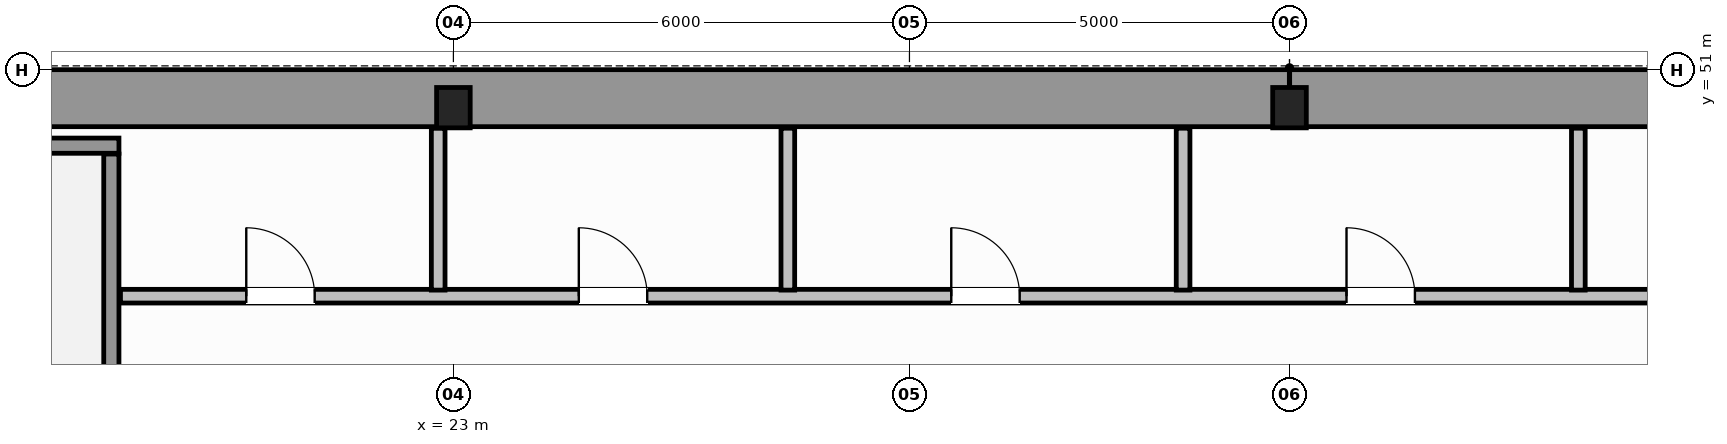
"""IFC4 building model, lengths in metres.
Left out: names, types, materials, properties, quantities, classifications, styles, units other than length and angle.
Written with IfcOpenShell. Run it as: python <this file> out.ifc"""

import sys

from ifc_helpers import new_model, si_unit, direction, frame, frame_2d, origin, origin_2d, place, context, subcontext, project, spatial, rectangle, i_section, extrude, source, transform, mapped, element, fill, save


model = new_model("IFC4")
c1 = context("Model", 3, precision=1e-05, world=origin(), true_north=direction((0.0, 1.0)))
c2 = subcontext(c1, "Body", "Model", "MODEL_VIEW")
j1 = project(units=[si_unit("LENGTHUNIT", "METRE"), si_unit("PLANEANGLEUNIT", "RADIAN")], contexts=[c1])
p1 = place(None, origin())
s1 = spatial("IfcSite", under=j1, at=p1, CompositionType="ELEMENT")
p2 = place(p1, origin())
s2 = spatial("IfcBuilding", under=s1, at=p2, CompositionType="ELEMENT")
p3 = place(p2, frame((0.0, 0.0, 95.8)))
s3 = spatial("IfcBuildingStorey", under=s2, at=p3, CompositionType="ELEMENT", Elevation=95.8)
m1 = source(origin(), c2, "Body", "SweptSolid", [
    extrude(i_section(OverallWidth=0.442, OverallDepth=0.531, WebThickness=0.065, FlangeThickness=0.076, FilletRadius=0.015, at=origin_2d()), origin(), (0.0, 0.0, 1.0), 3.8),
])
for number, where, z_axis, x_axis in (
    (1, (23.0, 50.5, 0.0), (0.0, 0.0, 1.0), (1.0, 0.0, 0.0)),
    (2, (34.0, 50.5, 0.0), (0.0, 0.0, 1.0), (1.0, 0.0, 0.0)),
):
    element("IfcColumn", number, at=place(p3, frame(where, z_axis=z_axis, x_axis=x_axis)), inside=s3, PredefinedType="COLUMN", context=c2, shape_type="MappedRepresentation", body=[
        mapped(m1, transform((0.0, 0.0, 0.0), scale=1.0)),
    ])
for number, where, z_axis, x_axis in (
    (3, (14.379, 50.625, 0.0), (0.0, 0.0, 1.0), (1.0, 0.0, 0.0)),
    (4, (34.002, 50.625, 0.0), (0.0, 0.0, 1.0), (1.0, 0.0, 0.0)),
):
    element("IfcWall", number, at=place(p3, frame(where, z_axis=z_axis, x_axis=x_axis)), inside=s3, PredefinedType="SHEAR", context=c2, shape_type="SweptSolid", body=[
        extrude(rectangle(XDim=19.619, YDim=0.75, at=frame_2d((9.81, 0.0))), origin(), (0.0, 0.0, 1.0), 3.8),
    ])
p4 = place(p3, frame((14.375, 50.0, 0.0), z_axis=(0.0, 0.0, 1.0), x_axis=(1.0, 0.0, 0.0)))
e5 = element("IfcWall", 5, at=p4, inside=s3, PredefinedType="SOLIDWALL", context=c2, shape_type="SweptSolid", body=[
    extrude(rectangle(XDim=4.225, YDim=0.2, at=frame_2d((2.113, 0.0))), origin(), (0.0, 0.0, 1.0), 3.8),
])
p5 = place(p3, frame((18.5, 39.96, 0.0), z_axis=(0.0, 0.0, 1.0), x_axis=(0.0, 1.0, 0.0)))
e6 = element("IfcWall", 6, at=p5, inside=s3, PredefinedType="SOLIDWALL", context=c2, shape_type="SweptSolid", body=[
    extrude(rectangle(XDim=9.93, YDim=0.2, at=frame_2d((4.965, 0.0))), origin(), (0.0, 0.0, 1.0), 3.8),
])
p6 = place(p3, frame((18.62, 48.02, 0.0), z_axis=(0.0, 0.0, 1.0), x_axis=(1.0, 0.0, 0.0)))
e7 = element("IfcWall", 7, at=p6, inside=s3, PredefinedType="PLUMBINGWALL", context=c2, shape_type="SweptSolid", body=[
    extrude(rectangle(XDim=30.76, YDim=0.18, at=frame_2d((15.38, 0.0))), origin(), (0.0, 0.0, 1.0), 3.58),
])
p7 = place(p6, frame((1.655, 0.0, 0.0)))
e8 = element("IfcOpeningElement", 8, at=p7, cuts=e7, PredefinedType="OPENING", context=c2, shape_type="SweptSolid", body=[
    extrude(rectangle(XDim=0.9, YDim=2.15, at=frame_2d((0.45, 1.075))), frame((0.0, 0.1, 0.0), z_axis=(0.0, -1.0, 0.0), x_axis=(1.0, 0.0, 0.0)), (0.0, 0.0, 1.0), 0.2),
])
p8 = place(p6, frame((6.03, 0.0, 0.0)))
e9 = element("IfcOpeningElement", 9, at=p8, cuts=e7, PredefinedType="OPENING", context=c2, shape_type="SweptSolid", body=[
    extrude(rectangle(XDim=0.9, YDim=2.15, at=frame_2d((0.45, 1.075))), frame((0.0, 0.1, 0.0), z_axis=(0.0, -1.0, 0.0), x_axis=(1.0, 0.0, 0.0)), (0.0, 0.0, 1.0), 0.2),
])
p9 = place(p6, frame((10.93, 0.0, 0.0)))
e10 = element("IfcOpeningElement", 10, at=p9, cuts=e7, PredefinedType="OPENING", context=c2, shape_type="SweptSolid", body=[
    extrude(rectangle(XDim=0.9, YDim=2.15, at=frame_2d((0.45, 1.075))), frame((0.0, 0.1, 0.0), z_axis=(0.0, -1.0, 0.0), x_axis=(1.0, 0.0, 0.0)), (0.0, 0.0, 1.0), 0.2),
])
p10 = place(p6, frame((16.13, 0.0, 0.0)))
e11 = element("IfcOpeningElement", 11, at=p10, cuts=e7, PredefinedType="OPENING", context=c2, shape_type="SweptSolid", body=[
    extrude(rectangle(XDim=0.9, YDim=2.15, at=frame_2d((0.45, 1.075))), frame((0.0, 0.1, 0.0), z_axis=(0.0, -1.0, 0.0), x_axis=(1.0, 0.0, 0.0)), (0.0, 0.0, 1.0), 0.2),
])
p11 = place(p6, frame((21.73, 0.0, 0.0)))
e12 = element("IfcOpeningElement", 12, at=p11, cuts=e7, PredefinedType="OPENING", context=c2, shape_type="SweptSolid", body=[
    extrude(rectangle(XDim=0.9, YDim=2.15, at=frame_2d((0.45, 1.075))), frame((0.0, 0.1, 0.0), z_axis=(0.0, -1.0, 0.0), x_axis=(1.0, 0.0, 0.0)), (0.0, 0.0, 1.0), 0.2),
])
p12 = place(p6, frame((27.505, 0.0, 0.0)))
e13 = element("IfcOpeningElement", 13, at=p12, cuts=e7, PredefinedType="OPENING", context=c2, shape_type="SweptSolid", body=[
    extrude(rectangle(XDim=0.9, YDim=2.15, at=frame_2d((0.45, 1.075))), frame((0.0, 0.1, 0.0), z_axis=(0.0, -1.0, 0.0), x_axis=(1.0, 0.0, 0.0)), (0.0, 0.0, 1.0), 0.2),
])
p13 = place(p3, frame((22.8, 48.1, 0.0), z_axis=(0.0, 0.0, 1.0), x_axis=(0.0, 1.0, 0.0)))
e14 = element("IfcWall", 14, at=p13, inside=s3, PredefinedType="PLUMBINGWALL", context=c2, shape_type="SweptSolid", body=[
    extrude(rectangle(XDim=2.13, YDim=0.18, at=frame_2d((1.065, 0.0))), origin(), (0.0, 0.0, 1.0), 2.87),
])
for number, where, z_axis, x_axis in (
    (15, (27.4, 48.1, 0.0), (0.0, 0.0, 1.0), (0.0, 1.0, 0.0)),
    (16, (32.6, 48.1, 0.0), (0.0, 0.0, 1.0), (0.0, 1.0, 0.0)),
    (17, (37.8, 48.1, 0.0), (0.0, 0.0, 1.0), (0.0, 1.0, 0.0)),
):
    element("IfcWall", number, at=place(p3, frame(where, z_axis=z_axis, x_axis=x_axis)), inside=s3, PredefinedType="PLUMBINGWALL", context=c2, shape_type="SweptSolid", body=[
        extrude(rectangle(XDim=2.13, YDim=0.18, at=frame_2d((1.065, 0.0))), origin(), (0.0, 0.0, 1.0), 3.58),
    ])
m2 = source(origin(), c2, "Body", "SweptSolid", [
    extrude(rectangle(XDim=0.9, YDim=2.15, at=frame_2d((0.45, 1.075))), frame((0.0, 0.025, 0.0), z_axis=(0.0, -1.0, 0.0), x_axis=(1.0, 0.0, 0.0)), (0.0, 0.0, 1.0), 0.05),
])
p14 = place(p7, origin())
e18 = element("IfcDoor", 18, at=p14, inside=s3, OperationType="SINGLE_SWING_LEFT", PredefinedType="DOOR", context=c2, shape_type="MappedRepresentation", body=[
    mapped(m2, transform((0.0, 0.0, 0.0), scale=1.0)),
])
fill(e8, e18)
p15 = place(p8, origin())
e19 = element("IfcDoor", 19, at=p15, inside=s3, OperationType="SINGLE_SWING_RIGHT", PredefinedType="DOOR", context=c2, shape_type="MappedRepresentation", body=[
    mapped(m2, transform((0.0, 0.0, 0.0), scale=1.0)),
])
fill(e9, e19)
p16 = place(p9, origin())
e20 = element("IfcDoor", 20, at=p16, inside=s3, OperationType="SINGLE_SWING_LEFT", PredefinedType="DOOR", context=c2, shape_type="MappedRepresentation", body=[
    mapped(m2, transform((0.0, 0.0, 0.0), scale=1.0)),
])
fill(e10, e20)
p17 = place(p10, origin())
e21 = element("IfcDoor", 21, at=p17, inside=s3, OperationType="SINGLE_SWING_RIGHT", PredefinedType="DOOR", context=c2, shape_type="MappedRepresentation", body=[
    mapped(m2, transform((0.0, 0.0, 0.0), scale=1.0)),
])
fill(e11, e21)
save(model, sys.argv[1])
